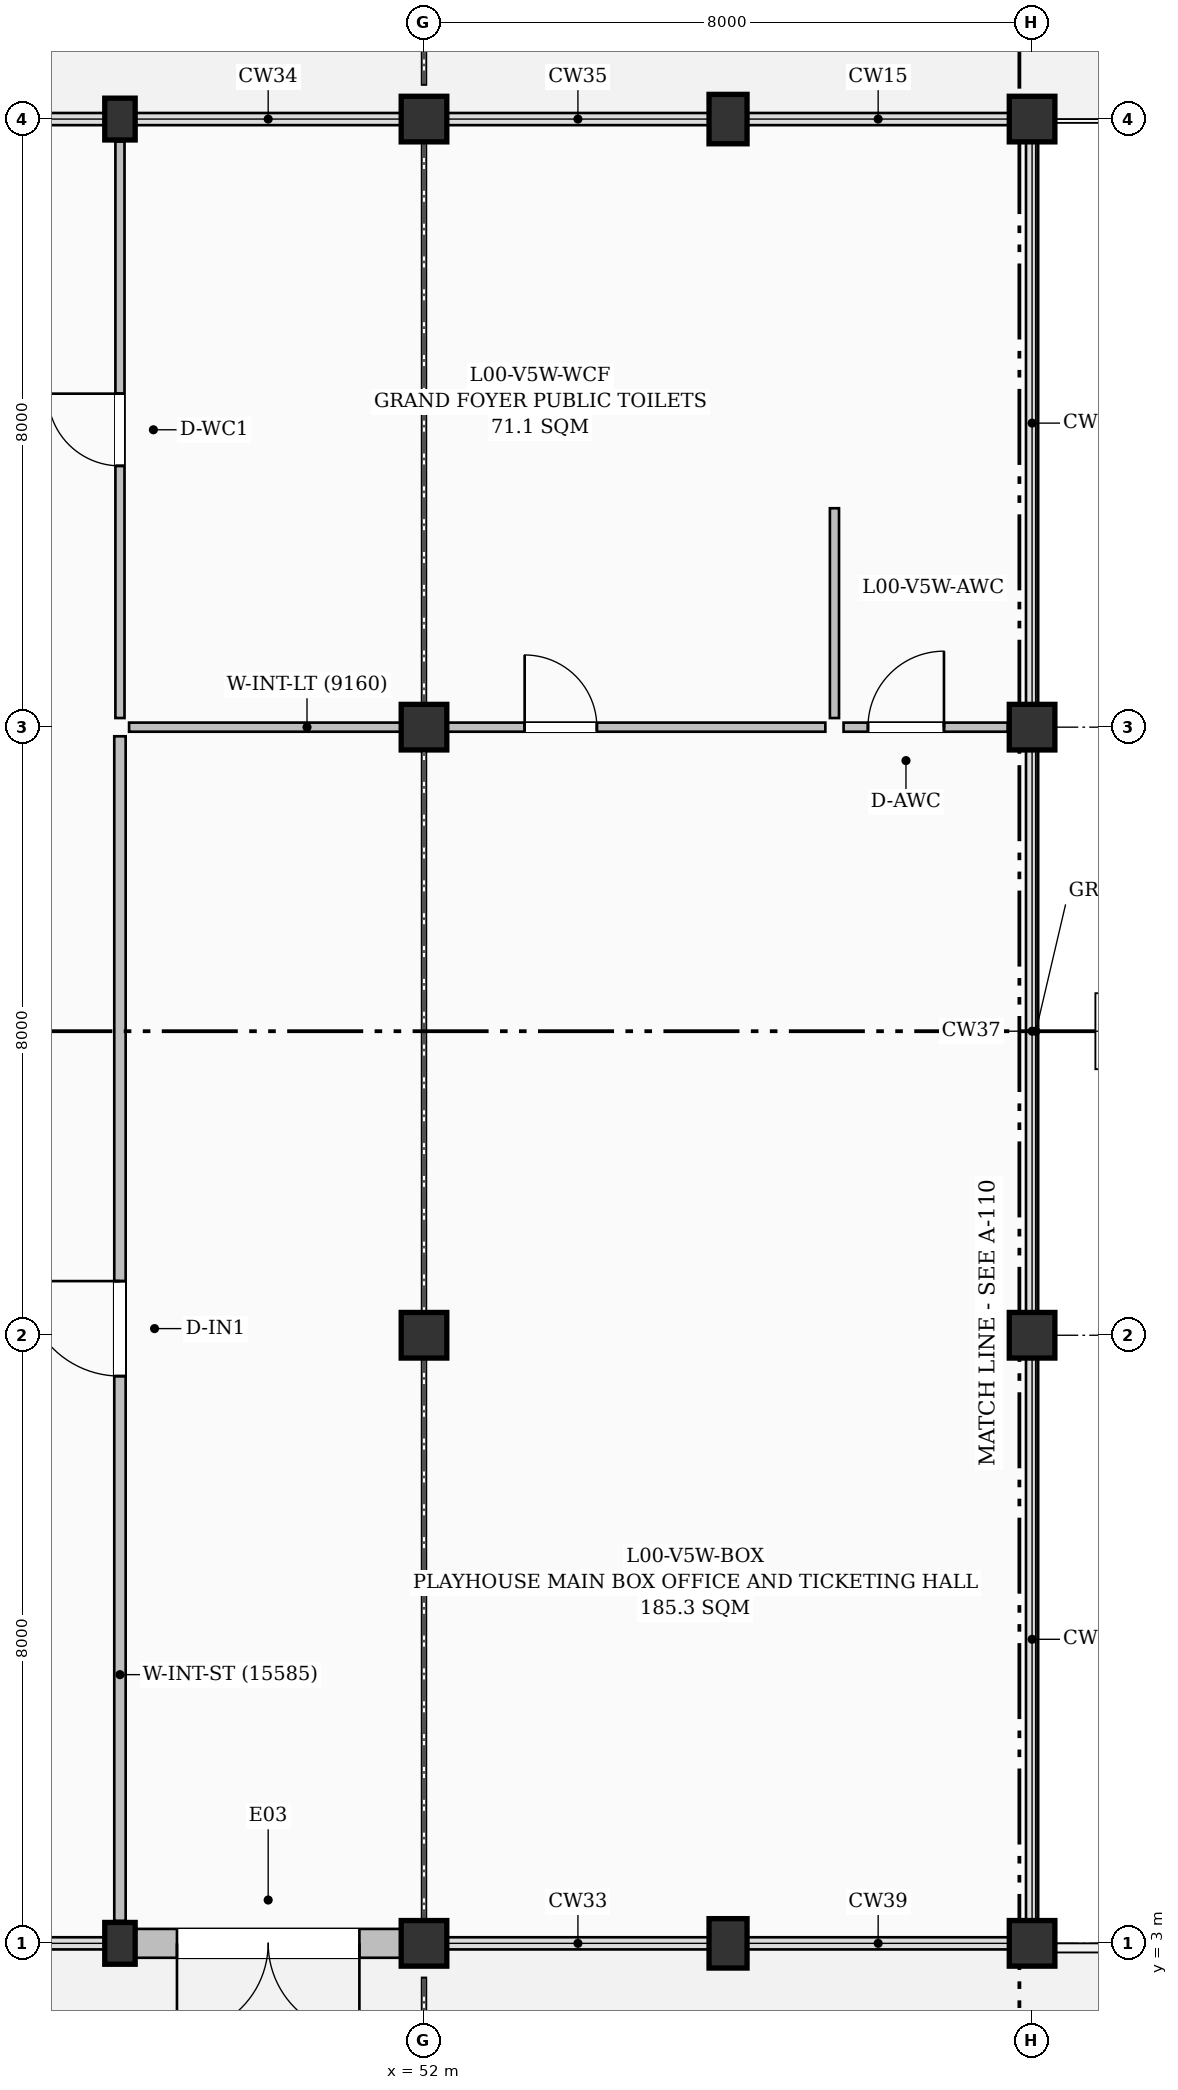
"""IFC4 building model, lengths in metres.
Left out: names, types, materials, properties, quantities, classifications, styles, units other than length and angle.
Written with IfcOpenShell. Run it as: python <this file> out.ifc"""

import sys

from ifc_helpers import new_model, si_unit, direction, frame, frame_2d, origin, origin_2d, place, context, subcontext, project, spatial, rectangle, circle, extrude, element, fill, save


model = new_model("IFC4")
c1 = context("Model", 3, precision=1e-05, world=origin(), true_north=direction((0.0, 1.0)))
c2 = subcontext(c1, "Body", "Model", "MODEL_VIEW")
j1 = project(units=[si_unit("LENGTHUNIT", "METRE"), si_unit("PLANEANGLEUNIT", "RADIAN")], contexts=[c1])
p1 = place(None, origin())
s1 = spatial("IfcSite", under=j1, at=p1, CompositionType="ELEMENT")
p2 = place(p1, origin())
s2 = spatial("IfcBuilding", under=s1, at=p2, CompositionType="ELEMENT")
p3 = place(p2, origin())
s3 = spatial("IfcBuildingStorey", under=s2, at=p3, CompositionType="ELEMENT", Elevation=0.0)
for number, where, z_axis, x_axis in (
    (1, (48.0, 3.0, 0.0), (0.0, 0.0, 1.0), (1.0, 0.0, 0.0)),
    (2, (48.0, 27.0, 0.0), (0.0, 0.0, 1.0), (1.0, 0.0, 0.0)),
):
    element("IfcColumn", number, at=place(p3, frame(where, z_axis=z_axis, x_axis=x_axis)), inside=s3, PredefinedType="PILASTER", context=c2, shape_type="SweptSolid", body=[
        extrude(rectangle(XDim=0.4, YDim=0.55, at=origin_2d()), origin(), (0.0, 0.0, 1.0), 4.8),
    ])
p4 = place(p3, frame((52.0, 3.0, 0.0), z_axis=(0.0, 0.0, 1.0), x_axis=(1.0, 0.0, 0.0)))
e3 = element("IfcColumn", 3, at=p4, inside=s3, PredefinedType="COLUMN", context=c2, shape_type="SweptSolid", body=[
    extrude(circle(Radius=0.3, at=origin_2d()), origin(), (0.0, 0.0, 1.0), 4.8),
])
for number, where, z_axis, x_axis in (
    (4, (52.0, 11.0, 0.0), (0.0, 0.0, 1.0), (1.0, 0.0, 0.0)),
    (5, (52.0, 19.0, 0.0), (0.0, 0.0, 1.0), (1.0, 0.0, 0.0)),
    (6, (52.0, 27.0, 0.0), (0.0, 0.0, 1.0), (1.0, 0.0, 0.0)),
):
    element("IfcColumn", number, at=place(p3, frame(where, z_axis=z_axis, x_axis=x_axis)), inside=s3, PredefinedType="COLUMN", context=c2, shape_type="SweptSolid", body=[
        extrude(rectangle(XDim=0.6, YDim=0.6, at=origin_2d()), origin(), (0.0, 0.0, 1.0), 4.8),
    ])
for number, where, z_axis, x_axis in (
    (7, (56.0, 3.0, 0.0), (0.0, 0.0, 1.0), (1.0, 0.0, 0.0)),
    (8, (56.0, 27.0, 0.0), (0.0, 0.0, 1.0), (1.0, 0.0, 0.0)),
):
    element("IfcColumn", number, at=place(p3, frame(where, z_axis=z_axis, x_axis=x_axis)), inside=s3, PredefinedType="PILASTER", context=c2, shape_type="SweptSolid", body=[
        extrude(rectangle(XDim=0.5, YDim=0.65, at=origin_2d()), origin(), (0.0, 0.0, 1.0), 4.8),
    ])
p5 = place(p3, frame((60.0, 3.0, 0.0), z_axis=(0.0, 0.0, 1.0), x_axis=(1.0, 0.0, 0.0)))
e9 = element("IfcColumn", 9, at=p5, inside=s3, PredefinedType="COLUMN", context=c2, shape_type="SweptSolid", body=[
    extrude(circle(Radius=0.3, at=origin_2d()), origin(), (0.0, 0.0, 1.0), 4.8),
])
for number, where, z_axis, x_axis in (
    (10, (60.0, 11.0, 0.0), (0.0, 0.0, 1.0), (1.0, 0.0, 0.0)),
    (11, (60.0, 19.0, 0.0), (0.0, 0.0, 1.0), (1.0, 0.0, 0.0)),
    (12, (60.0, 27.0, 0.0), (0.0, 0.0, 1.0), (1.0, 0.0, 0.0)),
):
    element("IfcColumn", number, at=place(p3, frame(where, z_axis=z_axis, x_axis=x_axis)), inside=s3, PredefinedType="COLUMN", context=c2, shape_type="SweptSolid", body=[
        extrude(rectangle(XDim=0.6, YDim=0.6, at=origin_2d()), origin(), (0.0, 0.0, 1.0), 4.8),
    ])
p6 = place(p3, frame((51.7, 3.0, 0.0), z_axis=(0.0, 0.0, 1.0), x_axis=(-1.0, 0.0, 0.0)))
e13 = element("IfcWall", 13, at=p6, inside=s3, PredefinedType="SOLIDWALL", context=c2, shape_type="SweptSolid", body=[
    extrude(rectangle(XDim=3.5, YDim=0.38, at=frame_2d((1.75, 0.0))), origin(), (0.0, 0.0, 1.0), 3.985),
])
p7 = place(p6, frame((0.55, 0.0, 0.0)))
e14 = element("IfcOpeningElement", 14, at=p7, cuts=e13, PredefinedType="OPENING", context=c2, shape_type="SweptSolid", body=[
    extrude(rectangle(XDim=2.4, YDim=2.4, at=frame_2d((1.2, 1.2))), frame((0.0, 0.2, 0.0), z_axis=(0.0, -1.0, 0.0), x_axis=(1.0, 0.0, 0.0)), (0.0, 0.0, 1.0), 0.4),
])
p8 = place(p3, frame((48.0, 3.295, 0.0), z_axis=(0.0, 0.0, 1.0), x_axis=(0.0, 1.0, 0.0)))
e15 = element("IfcWall", 15, at=p8, inside=s3, PredefinedType="PARTITIONING", context=c2, shape_type="SweptSolid", body=[
    extrude(rectangle(XDim=15.585, YDim=0.15, at=frame_2d((7.792, 0.0))), origin(), (0.0, 0.0, 1.0), 4.55),
])
p9 = place(p8, frame((7.167, 0.0, 0.0)))
e16 = element("IfcOpeningElement", 16, at=p9, cuts=e15, PredefinedType="OPENING", context=c2, shape_type="SweptSolid", body=[
    extrude(rectangle(XDim=1.25, YDim=2.15, at=frame_2d((0.625, 1.075))), frame((0.0, 0.085, 0.0), z_axis=(0.0, -1.0, 0.0), x_axis=(1.0, 0.0, 0.0)), (0.0, 0.0, 1.0), 0.17),
])
p10 = place(p3, frame((48.0, 19.12, 0.0), z_axis=(0.0, 0.0, 1.0), x_axis=(0.0, 1.0, 0.0)))
e17 = element("IfcWall", 17, at=p10, inside=s3, PredefinedType="PARTITIONING", context=c2, shape_type="SweptSolid", body=[
    extrude(rectangle(XDim=7.585, YDim=0.12, at=frame_2d((3.792, 0.0))), origin(), (0.0, 0.0, 1.0), 4.55),
])
p11 = place(p10, frame((3.317, 0.0, 0.0)))
e18 = element("IfcOpeningElement", 18, at=p11, cuts=e17, PredefinedType="OPENING", context=c2, shape_type="SweptSolid", body=[
    extrude(rectangle(XDim=0.95, YDim=2.1, at=frame_2d((0.475, 1.05))), frame((0.0, 0.07, 0.0), z_axis=(0.0, -1.0, 0.0), x_axis=(1.0, 0.0, 0.0)), (0.0, 0.0, 1.0), 0.14),
])
p12 = place(p3, frame((48.12, 19.0, 0.0), z_axis=(0.0, 0.0, 1.0), x_axis=(1.0, 0.0, 0.0)))
e19 = element("IfcWall", 19, at=p12, inside=s3, PredefinedType="PARTITIONING", context=c2, shape_type="SweptSolid", body=[
    extrude(rectangle(XDim=9.16, YDim=0.12, at=frame_2d((4.58, 0.0))), origin(), (0.0, 0.0, 1.0), 3.735),
])
p13 = place(p12, frame((5.204, 0.0, 0.0)))
e20 = element("IfcOpeningElement", 20, at=p13, cuts=e19, PredefinedType="OPENING", context=c2, shape_type="SweptSolid", body=[
    extrude(rectangle(XDim=0.95, YDim=2.1, at=frame_2d((0.475, 1.05))), frame((0.0, 0.07, 0.0), z_axis=(0.0, -1.0, 0.0), x_axis=(1.0, 0.0, 0.0)), (0.0, 0.0, 1.0), 0.14),
])
p14 = place(p3, frame((57.52, 19.0, 0.0), z_axis=(0.0, 0.0, 1.0), x_axis=(1.0, 0.0, 0.0)))
e21 = element("IfcWall", 21, at=p14, inside=s3, PredefinedType="PARTITIONING", context=c2, shape_type="SweptSolid", body=[
    extrude(rectangle(XDim=2.16, YDim=0.12, at=frame_2d((1.08, 0.0))), origin(), (0.0, 0.0, 1.0), 4.245),
])
p15 = place(p14, frame((0.321, 0.0, 0.0)))
e22 = element("IfcOpeningElement", 22, at=p15, cuts=e21, PredefinedType="OPENING", context=c2, shape_type="SweptSolid", body=[
    extrude(rectangle(XDim=1.0, YDim=2.1, at=frame_2d((0.5, 1.05))), frame((0.0, 0.07, 0.0), z_axis=(0.0, -1.0, 0.0), x_axis=(1.0, 0.0, 0.0)), (0.0, 0.0, 1.0), 0.14),
])
p16 = place(p3, frame((57.4, 19.12, 0.0), z_axis=(0.0, 0.0, 1.0), x_axis=(0.0, 1.0, 0.0)))
e23 = element("IfcWall", 23, at=p16, inside=s3, PredefinedType="PARTITIONING", context=c2, shape_type="SweptSolid", body=[
    extrude(rectangle(XDim=2.76, YDim=0.12, at=frame_2d((1.38, 0.0))), origin(), (0.0, 0.0, 1.0), 4.55),
])
p17 = place(p7, origin())
e24 = element("IfcDoor", 24, at=p17, inside=s3, OperationType="DOUBLE_DOOR_SINGLE_SWING", PredefinedType="DOOR", context=c2, shape_type="SweptSolid", body=[
    extrude(rectangle(XDim=2.4, YDim=2.4, at=frame_2d((1.2, 1.2))), frame((0.0, 0.025, 0.0), z_axis=(0.0, -1.0, 0.0), x_axis=(1.0, 0.0, 0.0)), (0.0, 0.0, 1.0), 0.05),
])
fill(e14, e24)
p18 = place(p9, origin())
e25 = element("IfcDoor", 25, at=p18, inside=s3, OperationType="SINGLE_SWING_RIGHT", PredefinedType="DOOR", context=c2, shape_type="SweptSolid", body=[
    extrude(rectangle(XDim=1.25, YDim=2.15, at=frame_2d((0.625, 1.075))), frame((0.0, 0.025, 0.0), z_axis=(0.0, -1.0, 0.0), x_axis=(1.0, 0.0, 0.0)), (0.0, 0.0, 1.0), 0.05),
])
fill(e16, e25)
p19 = place(p11, origin())
e26 = element("IfcDoor", 26, at=p19, inside=s3, OperationType="SINGLE_SWING_RIGHT", PredefinedType="DOOR", context=c2, shape_type="SweptSolid", body=[
    extrude(rectangle(XDim=0.95, YDim=2.1, at=frame_2d((0.475, 1.05))), frame((0.0, 0.025, 0.0), z_axis=(0.0, -1.0, 0.0), x_axis=(1.0, 0.0, 0.0)), (0.0, 0.0, 1.0), 0.05),
])
fill(e18, e26)
p20 = place(p13, origin())
e27 = element("IfcDoor", 27, at=p20, inside=s3, OperationType="SINGLE_SWING_LEFT", PredefinedType="DOOR", context=c2, shape_type="SweptSolid", body=[
    extrude(rectangle(XDim=0.95, YDim=2.1, at=frame_2d((0.475, 1.05))), frame((0.0, 0.025, 0.0), z_axis=(0.0, -1.0, 0.0), x_axis=(1.0, 0.0, 0.0)), (0.0, 0.0, 1.0), 0.05),
])
fill(e20, e27)
p21 = place(p15, origin())
e28 = element("IfcDoor", 28, at=p21, inside=s3, OperationType="SINGLE_SWING_RIGHT", PredefinedType="DOOR", context=c2, shape_type="SweptSolid", body=[
    extrude(rectangle(XDim=1.0, YDim=2.1, at=frame_2d((0.5, 1.05))), frame((0.0, 0.025, 0.0), z_axis=(0.0, -1.0, 0.0), x_axis=(1.0, 0.0, 0.0)), (0.0, 0.0, 1.0), 0.05),
])
fill(e22, e28)
save(model, sys.argv[1])
